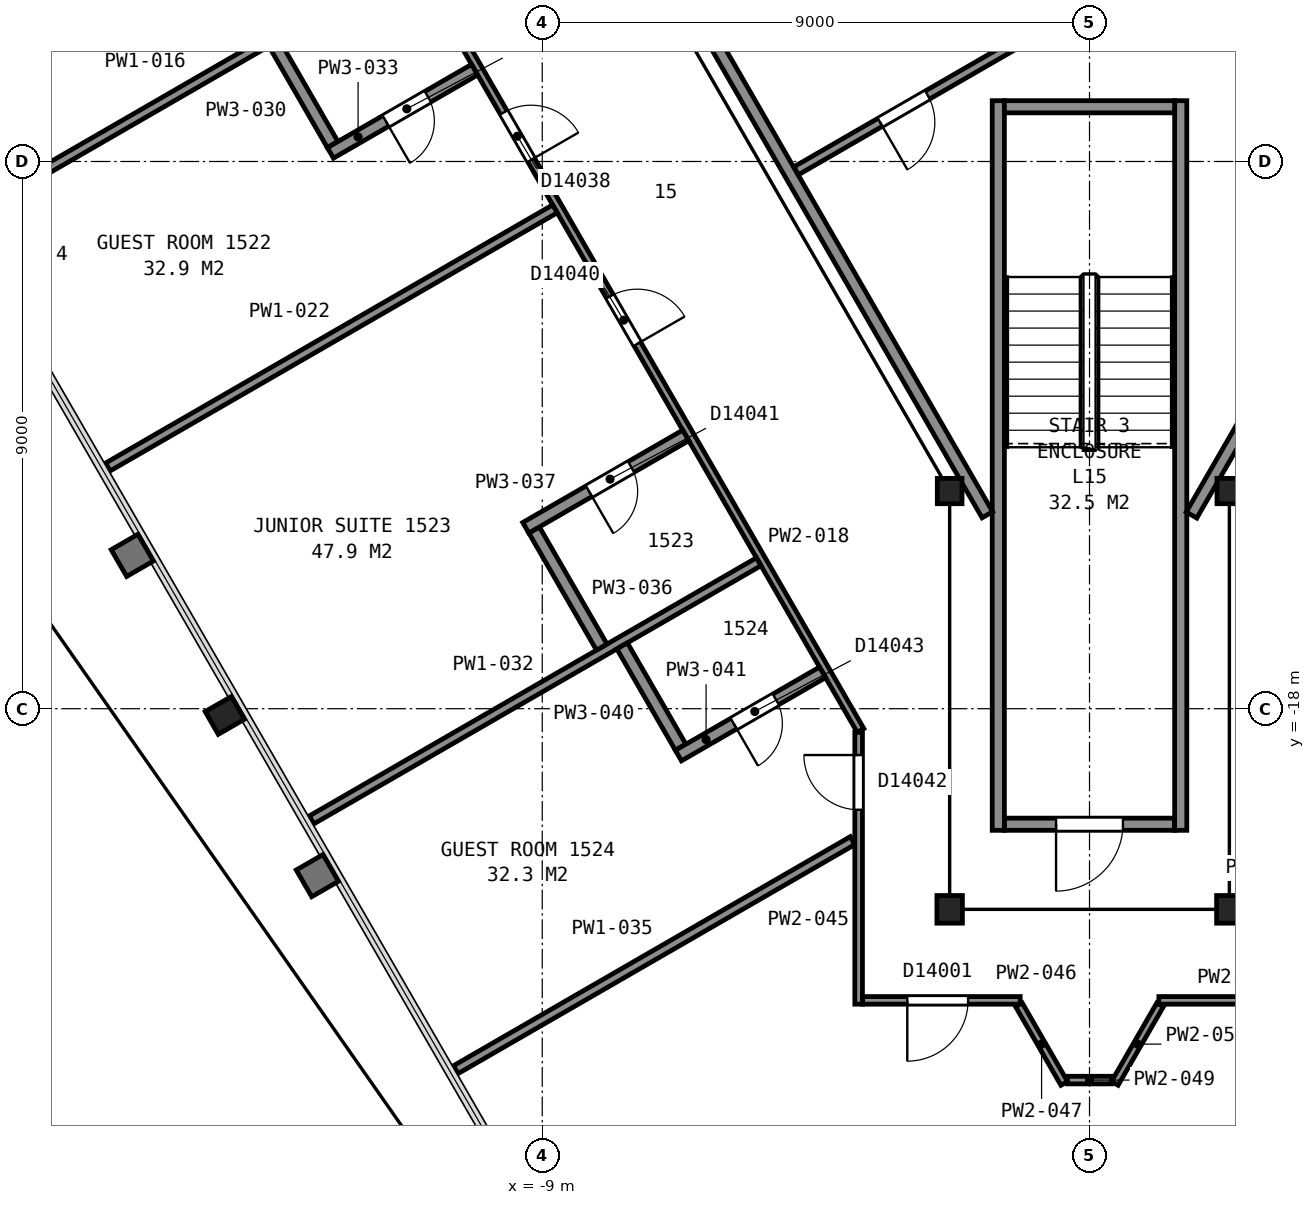
"""IFC4 building model, lengths in metres.
Left out: names, types, materials, properties, quantities, classifications, styles, units other than length and angle.
Written with IfcOpenShell. Run it as: python <this file> out.ifc"""

import sys

from ifc_helpers import new_model, si_unit, direction, frame, frame_2d, origin, origin_2d, place, context, subcontext, project, spatial, rectangle, i_section, extrude, element, fill, save


model = new_model("IFC4")
c1 = context("Model", 3, precision=1e-05, world=origin(), true_north=direction((0.0, 1.0)))
c2 = subcontext(c1, "Body", "Model", "MODEL_VIEW")
j1 = project(units=[si_unit("LENGTHUNIT", "METRE"), si_unit("PLANEANGLEUNIT", "RADIAN")], contexts=[c1])
p1 = place(None, origin())
s1 = spatial("IfcSite", under=j1, at=p1, CompositionType="ELEMENT")
p2 = place(p1, origin())
s2 = spatial("IfcBuilding", under=s1, at=p2, CompositionType="ELEMENT")
p3 = place(p2, frame((0.0, 0.0, 69.2)))
s3 = spatial("IfcBuildingStorey", under=s2, at=p3, CompositionType="ELEMENT", Elevation=69.2)
p4 = place(p3, frame((-14.22, -18.11, 0.0), z_axis=(0.0, 0.0, 1.0), x_axis=(-0.5, 0.866025403784, 0.0)))
e1 = element("IfcColumn", 1, at=p4, inside=s3, PredefinedType="COLUMN", context=c2, shape_type="SweptSolid", body=[
    extrude(i_section(OverallWidth=0.432, OverallDepth=0.498, WebThickness=0.056, FlangeThickness=0.089, FilletRadius=0.015, at=origin_2d()), origin(), (0.0, 0.0, 1.0), 3.575),
])
p5 = place(p3, frame((-2.3, -14.42, 0.0), z_axis=(0.0, 0.0, 1.0), x_axis=(1.0, 0.0, 0.0)))
e2 = element("IfcColumn", 2, at=p5, inside=s3, PredefinedType="COLUMN", context=c2, shape_type="SweptSolid", body=[
    extrude(i_section(OverallWidth=0.406, OverallDepth=0.417, WebThickness=0.03, FlangeThickness=0.048, FilletRadius=0.015, at=origin_2d()), origin(), (0.0, 0.0, 1.0), 3.6),
])
for number, where, z_axis, x_axis in (
    (3, (-2.3, -21.3, 0.0), (0.0, 0.0, 1.0), (-1.0, 0.0, 0.0)),
    (4, (2.3, -21.3, 0.0), (0.0, 0.0, 1.0), (-1.0, 0.0, 0.0)),
):
    element("IfcColumn", number, at=place(p3, frame(where, z_axis=z_axis, x_axis=x_axis)), inside=s3, PredefinedType="COLUMN", context=c2, shape_type="SweptSolid", body=[
        extrude(i_section(OverallWidth=0.419, OverallDepth=0.455, WebThickness=0.042, FlangeThickness=0.068, FilletRadius=0.015, at=origin_2d()), origin(), (0.0, 0.0, 1.0), 3.6),
    ])
p6 = place(p3, frame((2.3, -14.42, 0.0), z_axis=(0.0, 0.0, 1.0), x_axis=(1.0, 0.0, 0.0)))
e5 = element("IfcColumn", 5, at=p6, inside=s3, PredefinedType="COLUMN", context=c2, shape_type="SweptSolid", body=[
    extrude(i_section(OverallWidth=0.406, OverallDepth=0.417, WebThickness=0.03, FlangeThickness=0.048, FilletRadius=0.015, at=origin_2d()), origin(), (0.0, 0.0, 1.0), 3.6),
])
p7 = place(p3, frame((-1.4, -19.9, 0.0), z_axis=(0.0, 0.0, 1.0), x_axis=(1.0, 0.0, 0.0)))
e6 = element("IfcWall", 6, at=p7, inside=s3, PredefinedType="PARTITIONING", context=c2, shape_type="SweptSolid", body=[
    extrude(rectangle(XDim=2.8, YDim=0.2, at=frame_2d((1.4, 0.0))), origin(), (0.0, 0.0, 1.0), 3.35),
])
p8 = place(p7, frame((0.85, 0.0, 0.0)))
e7 = element("IfcOpeningElement", 7, at=p8, cuts=e6, PredefinedType="OPENING", context=c2, shape_type="SweptSolid", body=[
    extrude(rectangle(XDim=1.1, YDim=2.1, at=frame_2d((0.55, 1.05))), frame((0.0, 0.11, 0.0), z_axis=(0.0, -1.0, 0.0), x_axis=(1.0, 0.0, 0.0)), (0.0, 0.0, 1.0), 0.22),
])
for number, where, z_axis, x_axis in (
    (8, (1.5, -8.0, 0.0), (0.0, 0.0, 1.0), (0.0, -1.0, 0.0)),
    (9, (-1.5, -8.0, 0.0), (0.0, 0.0, 1.0), (0.0, -1.0, 0.0)),
):
    element("IfcWall", number, at=place(p3, frame(where, z_axis=z_axis, x_axis=x_axis)), inside=s3, PredefinedType="PARTITIONING", context=c2, shape_type="SweptSolid", body=[
        extrude(rectangle(XDim=12.0, YDim=0.2, at=frame_2d((6.0, 0.0))), origin(), (0.0, 0.0, 1.0), 3.35),
    ])
p9 = place(p3, frame((-1.4, -8.1, 0.0), z_axis=(0.0, 0.0, 1.0), x_axis=(1.0, 0.0, 0.0)))
e10 = element("IfcWall", 10, at=p9, inside=s3, PredefinedType="PARTITIONING", context=c2, shape_type="SweptSolid", body=[
    extrude(rectangle(XDim=2.8, YDim=0.2, at=frame_2d((1.4, 0.0))), origin(), (0.0, 0.0, 1.0), 3.35),
])
p10 = place(p3, frame((-13.664, 5.946, 0.0), z_axis=(0.0, 0.0, 1.0), x_axis=(0.499994327219, -0.866028678941, 0.0)))
e11 = element("IfcWall", 11, at=p10, inside=s3, PredefinedType="PARTITIONING", context=c2, shape_type="SweptSolid", body=[
    extrude(rectangle(XDim=23.968, YDim=0.2, at=frame_2d((11.984, 0.0))), origin(), (0.0, 0.0, 1.0), 3.35),
])
p11 = place(p3, frame((-4.825, -9.154, 0.0), z_axis=(0.0, 0.0, 1.0), x_axis=(0.866023738697, 0.500002884005, 0.0)))
e12 = element("IfcWall", 12, at=p11, inside=s3, PredefinedType="PARTITIONING", context=c2, shape_type="SweptSolid", body=[
    extrude(rectangle(XDim=4.22, YDim=0.15, at=frame_2d((2.11, 0.0))), origin(), (0.0, 0.0, 1.0), 3.35),
])
p12 = place(p11, frame((1.595, 0.0, 0.0)))
e13 = element("IfcOpeningElement", 13, at=p12, cuts=e12, PredefinedType="OPENING", context=c2, shape_type="SweptSolid", body=[
    extrude(rectangle(XDim=0.9, YDim=2.1, at=frame_2d((0.45, 1.05))), frame((0.0, 0.085, 0.0), z_axis=(0.0, -1.0, 0.0), x_axis=(1.0, 0.0, 0.0)), (0.0, 0.0, 1.0), 0.17),
])
p13 = place(p3, frame((1.677, -14.815, 0.0), z_axis=(0.0, 0.0, 1.0), x_axis=(0.49999445743, 0.866028603765, 0.0)))
e14 = element("IfcWall", 14, at=p13, inside=s3, PredefinedType="PARTITIONING", context=c2, shape_type="SweptSolid", body=[
    extrude(rectangle(XDim=5.905, YDim=0.2, at=frame_2d((2.952, 0.0))), origin(), (0.0, 0.0, 1.0), 3.35),
])
p14 = place(p13, frame((3.855, 0.0, 0.0)))
e15 = element("IfcOpeningElement", 15, at=p14, cuts=e14, PredefinedType="OPENING", context=c2, shape_type="SweptSolid", body=[
    extrude(rectangle(XDim=1.8, YDim=2.1, at=frame_2d((0.9, 1.05))), frame((0.0, 0.11, 0.0), z_axis=(0.0, -1.0, 0.0), x_axis=(1.0, 0.0, 0.0)), (0.0, 0.0, 1.0), 0.22),
])
p15 = place(p3, frame((-18.517, -9.917, 0.0), z_axis=(0.0, 0.0, 1.0), x_axis=(0.866017528739, 0.50001363973, 0.0)))
e16 = element("IfcWall", 16, at=p15, inside=s3, PredefinedType="PARTITIONING", context=c2, shape_type="SweptSolid", body=[
    extrude(rectangle(XDim=8.491, YDim=0.15, at=frame_2d((4.246, 0.0))), origin(), (0.0, 0.0, 1.0), 2.613),
])
p16 = place(p3, frame((-3.766, -18.358, 0.0), z_axis=(0.0, 0.0, 1.0), x_axis=(-0.500003973642, 0.866023109589, 0.0)))
e17 = element("IfcWall", 17, at=p16, inside=s3, PredefinedType="PARTITIONING", context=c2, shape_type="SweptSolid", body=[
    extrude(rectangle(XDim=28.826, YDim=0.125, at=frame_2d((14.413, 0.0))), origin(), (0.0, 0.0, 1.0), 2.613),
])
p17 = place(p16, frame((27.114, 0.0, 0.0)))
e18 = element("IfcOpeningElement", 18, at=p17, cuts=e17, PredefinedType="OPENING", context=c2, shape_type="SweptSolid", body=[
    extrude(rectangle(XDim=0.9, YDim=2.1, at=frame_2d((0.45, 1.05))), frame((0.0, 0.073, 0.0), z_axis=(0.0, -1.0, 0.0), x_axis=(1.0, 0.0, 0.0)), (0.0, 0.0, 1.0), 0.145),
])
p18 = place(p16, frame((20.322, 0.0, 0.0)))
e19 = element("IfcOpeningElement", 19, at=p18, cuts=e17, PredefinedType="OPENING", context=c2, shape_type="SweptSolid", body=[
    extrude(rectangle(XDim=0.9, YDim=2.1, at=frame_2d((0.45, 1.05))), frame((0.0, 0.073, 0.0), z_axis=(0.0, -1.0, 0.0), x_axis=(1.0, 0.0, 0.0)), (0.0, 0.0, 1.0), 0.145),
])
p19 = place(p16, frame((17.68, 0.0, 0.0)))
e20 = element("IfcOpeningElement", 20, at=p19, cuts=e17, PredefinedType="OPENING", context=c2, shape_type="SweptSolid", body=[
    extrude(rectangle(XDim=0.9, YDim=2.1, at=frame_2d((0.45, 1.05))), frame((0.0, 0.073, 0.0), z_axis=(0.0, -1.0, 0.0), x_axis=(1.0, 0.0, 0.0)), (0.0, 0.0, 1.0), 0.145),
])
p20 = place(p16, frame((10.836, 0.0, 0.0)))
e21 = element("IfcOpeningElement", 21, at=p20, cuts=e17, PredefinedType="OPENING", context=c2, shape_type="SweptSolid", body=[
    extrude(rectangle(XDim=0.9, YDim=2.1, at=frame_2d((0.45, 1.05))), frame((0.0, 0.073, 0.0), z_axis=(0.0, -1.0, 0.0), x_axis=(1.0, 0.0, 0.0)), (0.0, 0.0, 1.0), 0.145),
])
p21 = place(p16, frame((7.342, 0.0, 0.0)))
e22 = element("IfcOpeningElement", 22, at=p21, cuts=e17, PredefinedType="OPENING", context=c2, shape_type="SweptSolid", body=[
    extrude(rectangle(XDim=0.9, YDim=2.1, at=frame_2d((0.45, 1.05))), frame((0.0, 0.073, 0.0), z_axis=(0.0, -1.0, 0.0), x_axis=(1.0, 0.0, 0.0)), (0.0, 0.0, 1.0), 0.145),
])
p22 = place(p3, frame((-16.145, -14.025, 0.0), z_axis=(0.0, 0.0, 1.0), x_axis=(0.866024716685, 0.500001190089, 0.0)))
e23 = element("IfcWall", 23, at=p22, inside=s3, PredefinedType="PARTITIONING", context=c2, shape_type="SweptSolid", body=[
    extrude(rectangle(XDim=8.492, YDim=0.15, at=frame_2d((4.246, 0.0))), origin(), (0.0, 0.0, 1.0), 2.613),
])
p23 = place(p3, frame((-13.407, -7.059, 0.0), z_axis=(0.0, 0.0, 1.0), x_axis=(0.499993829411, -0.866028966346, 0.0)))
e24 = element("IfcWall", 24, at=p23, inside=s3, PredefinedType="PARTITIONING", context=c2, shape_type="SweptSolid", body=[
    extrude(rectangle(XDim=1.921, YDim=0.2, at=frame_2d((0.96, 0.0))), origin(), (0.0, 0.0, 1.0), 2.613),
])
p24 = place(p3, frame((-12.794, -19.829, 0.0), z_axis=(0.0, 0.0, 1.0), x_axis=(0.866024716685, 0.500001190089, 0.0)))
e25 = element("IfcWall", 25, at=p24, inside=s3, PredefinedType="PARTITIONING", context=c2, shape_type="SweptSolid", body=[
    extrude(rectangle(XDim=8.492, YDim=0.15, at=frame_2d((4.246, 0.0))), origin(), (0.0, 0.0, 1.0), 2.613),
])
p25 = place(p3, frame((-12.484, -8.859, 0.0), z_axis=(0.0, 0.0, 1.0), x_axis=(0.866028150195, 0.499995243048, 0.0)))
e26 = element("IfcWall", 26, at=p25, inside=s3, PredefinedType="PARTITIONING", context=c2, shape_type="SweptSolid", body=[
    extrude(rectangle(XDim=2.737, YDim=0.2, at=frame_2d((1.369, 0.0))), origin(), (0.0, 0.0, 1.0), 2.613),
])
p26 = place(p25, frame((1.05, 0.0, 0.0)))
e27 = element("IfcOpeningElement", 27, at=p26, cuts=e26, PredefinedType="OPENING", context=c2, shape_type="SweptSolid", body=[
    extrude(rectangle(XDim=0.8, YDim=2.1, at=frame_2d((0.4, 1.05))), frame((0.0, 0.11, 0.0), z_axis=(0.0, -1.0, 0.0), x_axis=(1.0, 0.0, 0.0)), (0.0, 0.0, 1.0), 0.22),
])
p27 = place(p3, frame((-10.423, -23.937, 0.0), z_axis=(0.0, 0.0, 1.0), x_axis=(0.866039368072, 0.499975812365, 0.0)))
e28 = element("IfcWall", 28, at=p27, inside=s3, PredefinedType="PARTITIONING", context=c2, shape_type="SweptSolid", body=[
    extrude(rectangle(XDim=7.535, YDim=0.15, at=frame_2d((3.768, 0.0))), origin(), (0.0, 0.0, 1.0), 2.613),
])
p28 = place(p3, frame((-9.134, -15.061, 0.0), z_axis=(0.0, 0.0, 1.0), x_axis=(0.500092923031, -0.865971748, 0.0)))
e29 = element("IfcWall", 29, at=p28, inside=s3, PredefinedType="PARTITIONING", context=c2, shape_type="SweptSolid", body=[
    extrude(rectangle(XDim=2.225, YDim=0.2, at=frame_2d((1.112, 0.0))), origin(), (0.0, 0.0, 1.0), 2.613),
])
p29 = place(p3, frame((-6.64, -13.505, 0.0), z_axis=(0.0, 0.0, 1.0), x_axis=(-0.866038344573, -0.499977585228, 0.0)))
e30 = element("IfcWall", 30, at=p29, inside=s3, PredefinedType="PARTITIONING", context=c2, shape_type="SweptSolid", body=[
    extrude(rectangle(XDim=3.037, YDim=0.2, at=frame_2d((1.519, 0.0))), origin(), (0.0, 0.0, 1.0), 2.613),
])
p30 = place(p29, frame((1.037, 0.0, 0.0)))
e31 = element("IfcOpeningElement", 31, at=p30, cuts=e30, PredefinedType="OPENING", context=c2, shape_type="SweptSolid", body=[
    extrude(rectangle(XDim=0.8, YDim=2.1, at=frame_2d((0.4, 1.05))), frame((0.0, 0.11, 0.0), z_axis=(0.0, -1.0, 0.0), x_axis=(1.0, 0.0, 0.0)), (0.0, 0.0, 1.0), 0.22),
])
p31 = place(p3, frame((-7.687, -16.967, 0.0), z_axis=(0.0, 0.0, 1.0), x_axis=(0.500026156197, -0.86601030197, 0.0)))
e32 = element("IfcWall", 32, at=p31, inside=s3, PredefinedType="PARTITIONING", context=c2, shape_type="SweptSolid", body=[
    extrude(rectangle(XDim=1.925, YDim=0.2, at=frame_2d((0.963, 0.0))), origin(), (0.0, 0.0, 1.0), 2.613),
])
p32 = place(p3, frame((-6.76, -18.771, 0.0), z_axis=(0.0, 0.0, 1.0), x_axis=(0.866005850709, 0.50003386539, 0.0)))
e33 = element("IfcWall", 33, at=p32, inside=s3, PredefinedType="PARTITIONING", context=c2, shape_type="SweptSolid", body=[
    extrude(rectangle(XDim=2.737, YDim=0.2, at=frame_2d((1.369, 0.0))), origin(), (0.0, 0.0, 1.0), 2.613),
])
p33 = place(p32, frame((1.05, 0.0, 0.0)))
e34 = element("IfcOpeningElement", 34, at=p33, cuts=e33, PredefinedType="OPENING", context=c2, shape_type="SweptSolid", body=[
    extrude(rectangle(XDim=0.8, YDim=2.1, at=frame_2d((0.4, 1.05))), frame((0.0, 0.11, 0.0), z_axis=(0.0, -1.0, 0.0), x_axis=(1.0, 0.0, 0.0)), (0.0, 0.0, 1.0), 0.22),
])
p34 = place(p3, frame((-3.797, -22.86, 0.0), z_axis=(0.0, 0.0, 1.0), x_axis=(0.0, 1.0, 0.0)))
e35 = element("IfcWall", 35, at=p34, inside=s3, PredefinedType="PARTITIONING", context=c2, shape_type="SweptSolid", body=[
    extrude(rectangle(XDim=4.471, YDim=0.125, at=frame_2d((2.235, 0.0))), origin(), (0.0, 0.0, 1.0), 2.613),
])
p35 = place(p34, frame((3.198, 0.0, 0.0)))
e36 = element("IfcOpeningElement", 36, at=p35, cuts=e35, PredefinedType="OPENING", context=c2, shape_type="SweptSolid", body=[
    extrude(rectangle(XDim=0.9, YDim=2.1, at=frame_2d((0.45, 1.05))), frame((0.0, 0.073, 0.0), z_axis=(0.0, -1.0, 0.0), x_axis=(1.0, 0.0, 0.0)), (0.0, 0.0, 1.0), 0.145),
])
p36 = place(p3, frame((-1.14, -22.797, 0.0), z_axis=(0.0, 0.0, 1.0), x_axis=(-1.0, 0.0, 0.0)))
e37 = element("IfcWall", 37, at=p36, inside=s3, PredefinedType="PARTITIONING", context=c2, shape_type="SweptSolid", body=[
    extrude(rectangle(XDim=2.592, YDim=0.125, at=frame_2d((1.296, 0.0))), origin(), (0.0, 0.0, 1.0), 2.613),
])
p37 = place(p36, frame((0.856, 0.0, 0.0)))
e38 = element("IfcOpeningElement", 38, at=p37, cuts=e37, PredefinedType="OPENING", context=c2, shape_type="SweptSolid", body=[
    extrude(rectangle(XDim=1.0, YDim=2.1, at=frame_2d((0.5, 1.05))), frame((0.0, 0.073, 0.0), z_axis=(0.0, -1.0, 0.0), x_axis=(1.0, 0.0, 0.0)), (0.0, 0.0, 1.0), 0.145),
])
p38 = place(p3, frame((-1.161, -22.871, 0.0), z_axis=(0.0, 0.0, 1.0), x_axis=(0.499609040113, -0.866251006947, 0.0)))
e39 = element("IfcWall", 39, at=p38, inside=s3, PredefinedType="PARTITIONING", context=c2, shape_type="SweptSolid", body=[
    extrude(rectangle(XDim=1.491, YDim=0.125, at=frame_2d((0.746, 0.0))), origin(), (0.0, 0.0, 1.0), 2.613),
])
p39 = place(p3, frame((-0.362, -24.108, 0.0), z_axis=(0.0, 0.0, 1.0), x_axis=(1.0, 0.0, 0.0)))
e40 = element("IfcWall", 40, at=p39, inside=s3, PredefinedType="PARTITIONING", context=c2, shape_type="SweptSolid", body=[
    extrude(rectangle(XDim=0.724, YDim=0.125, at=frame_2d((0.362, 0.0))), origin(), (0.0, 0.0, 1.0), 2.613),
])
p40 = place(p3, frame((0.416, -24.162, 0.0), z_axis=(0.0, 0.0, 1.0), x_axis=(0.499609040113, 0.866251006947, 0.0)))
e41 = element("IfcWall", 41, at=p40, inside=s3, PredefinedType="PARTITIONING", context=c2, shape_type="SweptSolid", body=[
    extrude(rectangle(XDim=1.491, YDim=0.125, at=frame_2d((0.746, 0.0))), origin(), (0.0, 0.0, 1.0), 2.613),
])
p41 = place(p3, frame((1.14, -22.797, 0.0), z_axis=(0.0, 0.0, 1.0), x_axis=(1.0, 0.0, 0.0)))
e42 = element("IfcWall", 42, at=p41, inside=s3, PredefinedType="PARTITIONING", context=c2, shape_type="SweptSolid", body=[
    extrude(rectangle(XDim=2.592, YDim=0.125, at=frame_2d((1.296, 0.0))), origin(), (0.0, 0.0, 1.0), 2.613),
])
p42 = place(p8, origin())
e43 = element("IfcDoor", 43, at=p42, inside=s3, OperationType="SINGLE_SWING_LEFT", PredefinedType="DOOR", context=c2, shape_type="SweptSolid", body=[
    extrude(rectangle(XDim=1.1, YDim=2.1, at=frame_2d((0.55, 1.05))), frame((0.0, 0.025, 0.0), z_axis=(0.0, -1.0, 0.0), x_axis=(1.0, 0.0, 0.0)), (0.0, 0.0, 1.0), 0.05),
])
fill(e7, e43)
p43 = place(p12, origin())
e44 = element("IfcDoor", 44, at=p43, inside=s3, OperationType="SINGLE_SWING_LEFT", PredefinedType="DOOR", context=c2, shape_type="SweptSolid", body=[
    extrude(rectangle(XDim=0.9, YDim=2.1, at=frame_2d((0.45, 1.05))), frame((0.0, 0.025, 0.0), z_axis=(0.0, -1.0, 0.0), x_axis=(1.0, 0.0, 0.0)), (0.0, 0.0, 1.0), 0.05),
])
fill(e13, e44)
p44 = place(p20, origin())
e45 = element("IfcDoor", 45, at=p44, inside=s3, OperationType="SINGLE_SWING_LEFT", PredefinedType="DOOR", context=c2, shape_type="SweptSolid", body=[
    extrude(rectangle(XDim=0.9, YDim=2.1, at=frame_2d((0.45, 1.05))), frame((0.0, 0.025, 0.0), z_axis=(0.0, -1.0, 0.0), x_axis=(1.0, 0.0, 0.0)), (0.0, 0.0, 1.0), 0.05),
])
fill(e21, e45)
p45 = place(p21, origin())
e46 = element("IfcDoor", 46, at=p45, inside=s3, OperationType="SINGLE_SWING_LEFT", PredefinedType="DOOR", context=c2, shape_type="SweptSolid", body=[
    extrude(rectangle(XDim=0.9, YDim=2.1, at=frame_2d((0.45, 1.05))), frame((0.0, 0.025, 0.0), z_axis=(0.0, -1.0, 0.0), x_axis=(1.0, 0.0, 0.0)), (0.0, 0.0, 1.0), 0.05),
])
fill(e22, e46)
p46 = place(p26, origin())
e47 = element("IfcDoor", 47, at=p46, inside=s3, OperationType="SINGLE_SWING_LEFT", PredefinedType="DOOR", context=c2, shape_type="SweptSolid", body=[
    extrude(rectangle(XDim=0.8, YDim=2.1, at=frame_2d((0.4, 1.05))), frame((0.0, 0.025, 0.0), z_axis=(0.0, -1.0, 0.0), x_axis=(1.0, 0.0, 0.0)), (0.0, 0.0, 1.0), 0.05),
])
fill(e27, e47)
p47 = place(p30, origin())
e48 = element("IfcDoor", 48, at=p47, inside=s3, OperationType="SINGLE_SWING_RIGHT", PredefinedType="DOOR", context=c2, shape_type="SweptSolid", body=[
    extrude(rectangle(XDim=0.8, YDim=2.1, at=frame_2d((0.4, 1.05))), frame((0.0, 0.025, 0.0), z_axis=(0.0, -1.0, 0.0), x_axis=(1.0, 0.0, 0.0)), (0.0, 0.0, 1.0), 0.05),
])
fill(e31, e48)
p48 = place(p33, origin())
e49 = element("IfcDoor", 49, at=p48, inside=s3, OperationType="SINGLE_SWING_LEFT", PredefinedType="DOOR", context=c2, shape_type="SweptSolid", body=[
    extrude(rectangle(XDim=0.8, YDim=2.1, at=frame_2d((0.4, 1.05))), frame((0.0, 0.025, 0.0), z_axis=(0.0, -1.0, 0.0), x_axis=(1.0, 0.0, 0.0)), (0.0, 0.0, 1.0), 0.05),
])
fill(e34, e49)
p49 = place(p35, origin())
e50 = element("IfcDoor", 50, at=p49, inside=s3, OperationType="SINGLE_SWING_RIGHT", PredefinedType="DOOR", context=c2, shape_type="SweptSolid", body=[
    extrude(rectangle(XDim=0.9, YDim=2.1, at=frame_2d((0.45, 1.05))), frame((0.0, 0.025, 0.0), z_axis=(0.0, -1.0, 0.0), x_axis=(1.0, 0.0, 0.0)), (0.0, 0.0, 1.0), 0.05),
])
fill(e36, e50)
p50 = place(p37, origin())
e51 = element("IfcDoor", 51, at=p50, inside=s3, OperationType="SINGLE_SWING_RIGHT", PredefinedType="DOOR", context=c2, shape_type="SweptSolid", body=[
    extrude(rectangle(XDim=1.0, YDim=2.1, at=frame_2d((0.5, 1.05))), frame((0.0, 0.025, 0.0), z_axis=(0.0, -1.0, 0.0), x_axis=(1.0, 0.0, 0.0)), (0.0, 0.0, 1.0), 0.05),
])
fill(e38, e51)
save(model, sys.argv[1])
